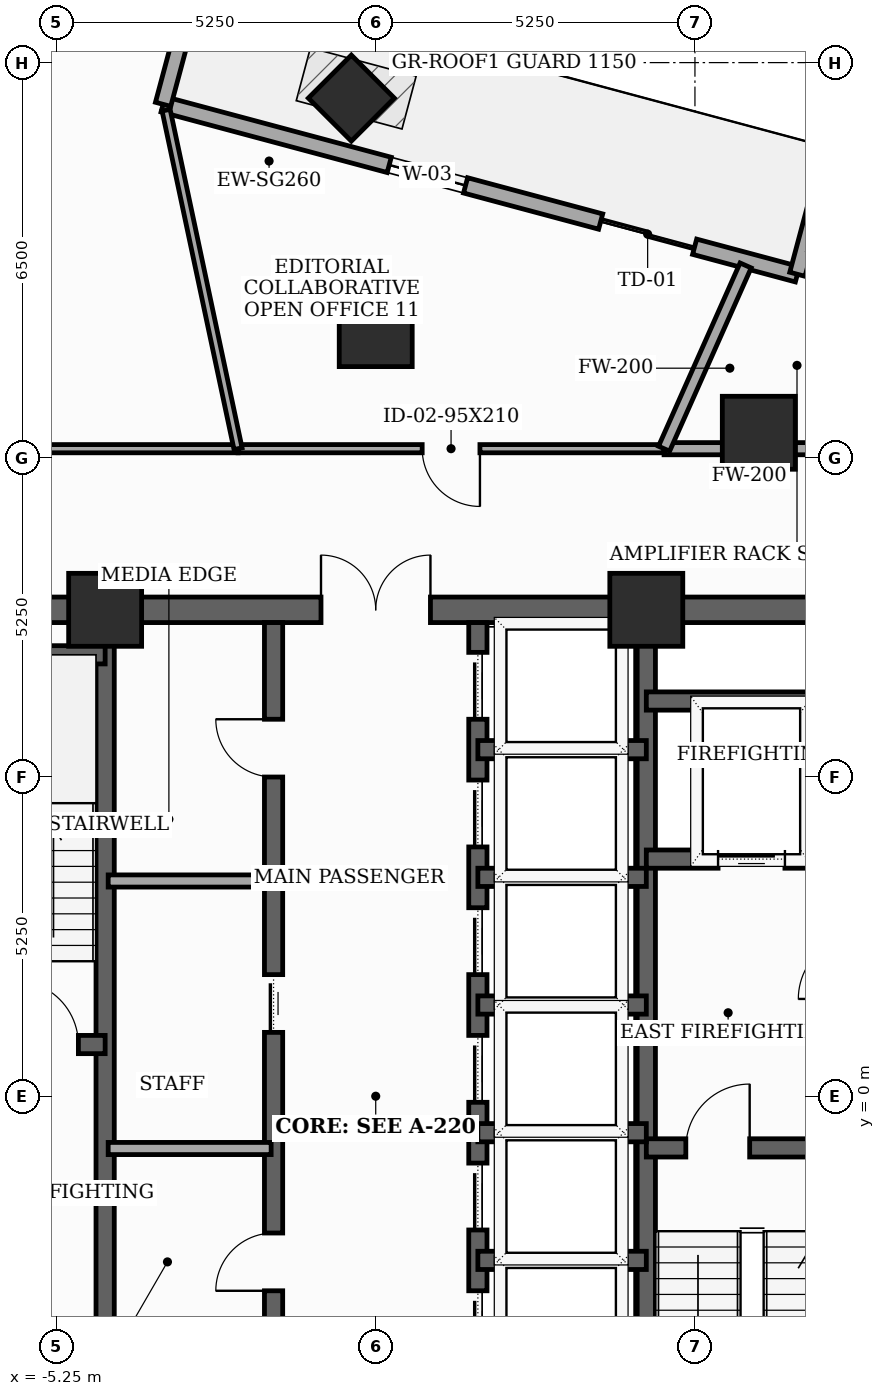
"""IFC4 building model, lengths in metres.
Left out: names, types, materials, properties, quantities, classifications, styles, units other than length and angle.
Written with IfcOpenShell. Run it as: python <this file> out.ifc"""

import sys

from ifc_helpers import new_model, si_unit, direction, frame, frame_2d, origin, origin_2d, place, context, subcontext, project, spatial, rectangle, extrude, element, fill, save


model = new_model("IFC4")
c1 = context("Model", 3, precision=1e-05, world=origin(), true_north=direction((0.0, 1.0)))
c2 = subcontext(c1, "Body", "Model", "MODEL_VIEW")
j1 = project(units=[si_unit("LENGTHUNIT", "METRE"), si_unit("PLANEANGLEUNIT", "RADIAN")], contexts=[c1])
p1 = place(None, origin())
s1 = spatial("IfcSite", under=j1, at=p1, CompositionType="ELEMENT")
p2 = place(p1, origin())
s2 = spatial("IfcBuilding", under=s1, at=p2, CompositionType="ELEMENT")
p3 = place(p2, frame((0.0, 0.0, 191.6)))
s3 = spatial("IfcBuildingStorey", under=s2, at=p3, CompositionType="ELEMENT", Elevation=191.6)
for number, where, z_axis, x_axis in (
    (1, (4.45, 8.0, 0.0), (0.0, 0.0, 1.0), (1.0, 0.0, 0.0)),
    (2, (-4.45, 8.0, 0.0), (0.0, 0.0, 1.0), (1.0, 0.0, 0.0)),
    (3, (6.3, 10.912, 0.0), (0.0, 0.0, 1.0), (1.0, 0.0, 0.0)),
    (4, (0.0, 12.6, 0.0), (0.0, 0.0, 1.0), (1.0, 0.0, 0.0)),
):
    element("IfcColumn", number, at=place(p3, frame(where, z_axis=z_axis, x_axis=x_axis)), inside=s3, PredefinedType="COLUMN", context=c2, shape_type="SweptSolid", body=[
        extrude(rectangle(XDim=1.2, YDim=1.2, at=origin_2d()), origin(), (0.0, 0.0, 1.0), 3.7),
    ])
p4 = place(p3, frame((-0.401, 16.416, 0.0), z_axis=(0.0, 0.0, 1.0), x_axis=(0.707106781187, 0.707106781187, 0.0)))
e5 = element("IfcColumn", 5, at=p4, inside=s3, PredefinedType="COLUMN", context=c2, shape_type="SweptSolid", body=[
    extrude(rectangle(XDim=1.0, YDim=1.0, at=origin_2d()), origin(), (0.0, 0.0, 1.0), 3.7),
])
p5 = place(p3, frame((6.935, 13.519, 0.0), z_axis=(0.0, 0.0, 1.0), x_axis=(-0.965922825334, 0.258830244561, 0.0)))
e6 = element("IfcWall", 6, at=p5, inside=s3, PredefinedType="SOLIDWALL", context=c2, shape_type="SweptSolid", body=[
    extrude(rectangle(XDim=10.8, YDim=0.26, at=frame_2d((5.4, 0.0))), origin(), (0.0, 0.0, 1.0), 3.5),
])
p6 = place(p5, frame((1.75, 0.0, 0.0)))
e7 = element("IfcOpeningElement", 7, at=p6, cuts=e6, PredefinedType="OPENING", context=c2, shape_type="SweptSolid", body=[
    extrude(rectangle(XDim=1.6, YDim=2.08, at=frame_2d((0.8, 1.04))), frame((0.0, 0.14, 0.0), z_axis=(0.0, -1.0, 0.0), x_axis=(1.0, 0.0, 0.0)), (0.0, 0.0, 1.0), 0.28),
])
p7 = place(p5, frame((5.65, 0.0, 0.85)))
e8 = element("IfcOpeningElement", 8, at=p7, cuts=e6, PredefinedType="OPENING", context=c2, shape_type="SweptSolid", body=[
    extrude(rectangle(XDim=1.3, YDim=1.25, at=frame_2d((0.65, 0.625))), frame((0.0, 0.14, 0.0), z_axis=(0.0, -1.0, 0.0), x_axis=(1.0, 0.0, 0.0)), (0.0, 0.0, 1.0), 0.28),
])
p8 = place(p3, frame((7.492, 15.595, 0.0), z_axis=(0.0, 0.0, 1.0), x_axis=(-0.258772030677, -0.96593842254, 0.0)))
e9 = element("IfcWall", 9, at=p8, inside=s3, PredefinedType="SOLIDWALL", context=c2, shape_type="SweptSolid", body=[
    extrude(rectangle(XDim=2.15, YDim=0.26, at=frame_2d((1.075, 0.0))), origin(), (0.0, 0.0, 1.0), 3.5),
])
p9 = place(p3, frame((-3.497, 16.314, 0.0), z_axis=(0.0, 0.0, 1.0), x_axis=(0.258800415469, 0.965930817892, 0.0)))
e10 = element("IfcWall", 10, at=p9, inside=s3, PredefinedType="SOLIDWALL", context=c2, shape_type="SweptSolid", body=[
    extrude(rectangle(XDim=2.15, YDim=0.26, at=frame_2d((1.075, 0.0))), origin(), (0.0, 0.0, 1.0), 3.5),
])
p10 = place(p3, frame((-8.0, 8.0, 0.0), z_axis=(0.0, 0.0, 1.0), x_axis=(1.0, 0.0, 0.0)))
e11 = element("IfcWall", 11, at=p10, inside=s3, PredefinedType="SHEAR", context=c2, shape_type="SweptSolid", body=[
    extrude(rectangle(XDim=16.0, YDim=0.42, at=frame_2d((8.0, 0.0))), origin(), (0.0, 0.0, 1.0), 3.5),
])
p11 = place(p10, frame((7.1, 0.0, 0.0)))
e12 = element("IfcOpeningElement", 12, at=p11, cuts=e11, PredefinedType="OPENING", context=c2, shape_type="SweptSolid", body=[
    extrude(rectangle(XDim=1.8, YDim=2.15, at=frame_2d((0.9, 1.075))), frame((0.0, 0.22, 0.0), z_axis=(0.0, -1.0, 0.0), x_axis=(1.0, 0.0, 0.0)), (0.0, 0.0, 1.0), 0.44),
])
for number, where, z_axis, x_axis in (
    (13, (-4.45, -7.79, 0.0), (0.0, 0.0, 1.0), (0.0, 1.0, 0.0)),
    (14, (4.45, -7.79, 0.0), (0.0, 0.0, 1.0), (0.0, 1.0, 0.0)),
):
    element("IfcWall", number, at=place(p3, frame(where, z_axis=z_axis, x_axis=x_axis)), inside=s3, PredefinedType="SHEAR", context=c2, shape_type="SweptSolid", body=[
        extrude(rectangle(XDim=15.58, YDim=0.3, at=frame_2d((7.79, 0.0))), origin(), (0.0, 0.0, 1.0), 3.5),
    ])
p12 = place(p3, frame((-7.79, 0.85, 0.0), z_axis=(0.0, 0.0, 1.0), x_axis=(1.0, 0.0, 0.0)))
e15 = element("IfcWall", 15, at=p12, inside=s3, PredefinedType="SHEAR", context=c2, shape_type="SweptSolid", body=[
    extrude(rectangle(XDim=3.34, YDim=0.3, at=frame_2d((1.67, 0.0))), origin(), (0.0, 0.0, 1.0), 3.5),
])
p13 = place(p12, frame((1.85, 0.0, 0.0)))
e16 = element("IfcOpeningElement", 16, at=p13, cuts=e15, PredefinedType="OPENING", context=c2, shape_type="SweptSolid", body=[
    extrude(rectangle(XDim=1.05, YDim=2.15, at=frame_2d((0.525, 1.075))), frame((0.0, 0.16, 0.0), z_axis=(0.0, -1.0, 0.0), x_axis=(1.0, 0.0, 0.0)), (0.0, 0.0, 1.0), 0.32),
])
p14 = place(p3, frame((-7.79, 7.26, 0.0), z_axis=(0.0, 0.0, 1.0), x_axis=(1.0, 0.0, 0.0)))
e17 = element("IfcWall", 17, at=p14, inside=s3, PredefinedType="SHEAR", context=c2, shape_type="SweptSolid", body=[
    extrude(rectangle(XDim=3.34, YDim=0.3, at=frame_2d((1.67, 0.0))), origin(), (0.0, 0.0, 1.0), 3.5),
])
p15 = place(p3, frame((4.45, -0.85, 0.0), z_axis=(0.0, 0.0, 1.0), x_axis=(1.0, 0.0, 0.0)))
e18 = element("IfcWall", 18, at=p15, inside=s3, PredefinedType="SHEAR", context=c2, shape_type="SweptSolid", body=[
    extrude(rectangle(XDim=3.34, YDim=0.3, at=frame_2d((1.67, 0.0))), origin(), (0.0, 0.0, 1.0), 3.5),
])
p16 = place(p15, frame((0.65, 0.0, 0.0)))
e19 = element("IfcOpeningElement", 19, at=p16, cuts=e18, PredefinedType="OPENING", context=c2, shape_type="SweptSolid", body=[
    extrude(rectangle(XDim=1.05, YDim=2.15, at=frame_2d((0.525, 1.075))), frame((0.0, 0.16, 0.0), z_axis=(0.0, -1.0, 0.0), x_axis=(1.0, 0.0, 0.0)), (0.0, 0.0, 1.0), 0.32),
])
p17 = place(p3, frame((4.45, 3.9, 0.0), z_axis=(0.0, 0.0, 1.0), x_axis=(1.0, 0.0, 0.0)))
e20 = element("IfcWall", 20, at=p17, inside=s3, PredefinedType="SHEAR", context=c2, shape_type="SweptSolid", body=[
    extrude(rectangle(XDim=3.34, YDim=0.3, at=frame_2d((1.67, 0.0))), origin(), (0.0, 0.0, 1.0), 3.5),
])
p18 = place(p17, frame((1.18, 0.0, 0.0)))
e21 = element("IfcOpeningElement", 21, at=p18, cuts=e20, PredefinedType="OPENING", context=c2, shape_type="SweptSolid", body=[
    extrude(rectangle(XDim=1.1, YDim=2.1, at=frame_2d((0.55, 1.05))), frame((0.0, 0.16, 0.0), z_axis=(0.0, -1.0, 0.0), x_axis=(1.0, 0.0, 0.0)), (0.0, 0.0, 1.0), 0.32),
])
p19 = place(p3, frame((4.45, 6.5, 0.0), z_axis=(0.0, 0.0, 1.0), x_axis=(1.0, 0.0, 0.0)))
e22 = element("IfcWall", 22, at=p19, inside=s3, PredefinedType="SHEAR", context=c2, shape_type="SweptSolid", body=[
    extrude(rectangle(XDim=3.34, YDim=0.3, at=frame_2d((1.67, 0.0))), origin(), (0.0, 0.0, 1.0), 3.5),
])
p20 = place(p3, frame((-1.68, -4.85, 0.0), z_axis=(0.0, 0.0, 1.0), x_axis=(0.0, 1.0, 0.0)))
e23 = element("IfcWall", 23, at=p20, inside=s3, PredefinedType="SHEAR", context=c2, shape_type="SweptSolid", body=[
    extrude(rectangle(XDim=12.64, YDim=0.3, at=frame_2d((6.32, 0.0))), origin(), (0.0, 0.0, 1.0), 3.5),
])
p21 = place(p20, frame((1.65, 0.0, 0.0)))
e24 = element("IfcOpeningElement", 24, at=p21, cuts=e23, PredefinedType="OPENING", context=c2, shape_type="SweptSolid", body=[
    extrude(rectangle(XDim=0.95, YDim=2.1, at=frame_2d((0.475, 1.05))), frame((0.0, 0.16, 0.0), z_axis=(0.0, -1.0, 0.0), x_axis=(1.0, 0.0, 0.0)), (0.0, 0.0, 1.0), 0.32),
])
p22 = place(p20, frame((5.9, 0.0, 0.0)))
e25 = element("IfcOpeningElement", 25, at=p22, cuts=e23, PredefinedType="OPENING", context=c2, shape_type="SweptSolid", body=[
    extrude(rectangle(XDim=0.95, YDim=2.1, at=frame_2d((0.475, 1.05))), frame((0.0, 0.16, 0.0), z_axis=(0.0, -1.0, 0.0), x_axis=(1.0, 0.0, 0.0)), (0.0, 0.0, 1.0), 0.32),
])
p23 = place(p20, frame((10.1, 0.0, 0.0)))
e26 = element("IfcOpeningElement", 26, at=p23, cuts=e23, PredefinedType="OPENING", context=c2, shape_type="SweptSolid", body=[
    extrude(rectangle(XDim=0.95, YDim=2.1, at=frame_2d((0.475, 1.05))), frame((0.0, 0.16, 0.0), z_axis=(0.0, -1.0, 0.0), x_axis=(1.0, 0.0, 0.0)), (0.0, 0.0, 1.0), 0.32),
])
p24 = place(p3, frame((1.68, -4.85, 0.0), z_axis=(0.0, 0.0, 1.0), x_axis=(0.0, 1.0, 0.0)))
e27 = element("IfcWall", 27, at=p24, inside=s3, PredefinedType="SHEAR", context=c2, shape_type="SweptSolid", body=[
    extrude(rectangle(XDim=12.64, YDim=0.3, at=frame_2d((6.32, 0.0))), origin(), (0.0, 0.0, 1.0), 3.5),
])
p25 = place(p24, frame((0.55, 0.0, 0.0)))
e28 = element("IfcOpeningElement", 28, at=p25, cuts=e27, PredefinedType="OPENING", context=c2, shape_type="SweptSolid", body=[
    extrude(rectangle(XDim=1.1, YDim=2.1, at=frame_2d((0.55, 1.05))), frame((0.0, 0.16, 0.0), z_axis=(0.0, -1.0, 0.0), x_axis=(1.0, 0.0, 0.0)), (0.0, 0.0, 1.0), 0.32),
])
p26 = place(p24, frame((2.65, 0.0, 0.0)))
e29 = element("IfcOpeningElement", 29, at=p26, cuts=e27, PredefinedType="OPENING", context=c2, shape_type="SweptSolid", body=[
    extrude(rectangle(XDim=1.1, YDim=2.1, at=frame_2d((0.55, 1.05))), frame((0.0, 0.16, 0.0), z_axis=(0.0, -1.0, 0.0), x_axis=(1.0, 0.0, 0.0)), (0.0, 0.0, 1.0), 0.32),
])
p27 = place(p24, frame((4.75, 0.0, 0.0)))
e30 = element("IfcOpeningElement", 30, at=p27, cuts=e27, PredefinedType="OPENING", context=c2, shape_type="SweptSolid", body=[
    extrude(rectangle(XDim=1.1, YDim=2.1, at=frame_2d((0.55, 1.05))), frame((0.0, 0.16, 0.0), z_axis=(0.0, -1.0, 0.0), x_axis=(1.0, 0.0, 0.0)), (0.0, 0.0, 1.0), 0.32),
])
p28 = place(p24, frame((6.85, 0.0, 0.0)))
e31 = element("IfcOpeningElement", 31, at=p28, cuts=e27, PredefinedType="OPENING", context=c2, shape_type="SweptSolid", body=[
    extrude(rectangle(XDim=1.1, YDim=2.1, at=frame_2d((0.55, 1.05))), frame((0.0, 0.16, 0.0), z_axis=(0.0, -1.0, 0.0), x_axis=(1.0, 0.0, 0.0)), (0.0, 0.0, 1.0), 0.32),
])
p29 = place(p24, frame((8.95, 0.0, 0.0)))
e32 = element("IfcOpeningElement", 32, at=p29, cuts=e27, PredefinedType="OPENING", context=c2, shape_type="SweptSolid", body=[
    extrude(rectangle(XDim=1.1, YDim=2.1, at=frame_2d((0.55, 1.05))), frame((0.0, 0.16, 0.0), z_axis=(0.0, -1.0, 0.0), x_axis=(1.0, 0.0, 0.0)), (0.0, 0.0, 1.0), 0.32),
])
p30 = place(p24, frame((11.05, 0.0, 0.0)))
e33 = element("IfcOpeningElement", 33, at=p30, cuts=e27, PredefinedType="OPENING", context=c2, shape_type="SweptSolid", body=[
    extrude(rectangle(XDim=1.1, YDim=2.1, at=frame_2d((0.55, 1.05))), frame((0.0, 0.16, 0.0), z_axis=(0.0, -1.0, 0.0), x_axis=(1.0, 0.0, 0.0)), (0.0, 0.0, 1.0), 0.32),
])
for number, where, z_axis, x_axis in (
    (34, (1.68, 1.5, 0.0), (0.0, 0.0, 1.0), (1.0, 0.0, 0.0)),
    (35, (1.68, 3.6, 0.0), (0.0, 0.0, 1.0), (1.0, 0.0, 0.0)),
    (36, (1.68, 5.7, 0.0), (0.0, 0.0, 1.0), (1.0, 0.0, 0.0)),
    (37, (1.68, -2.7, 0.0), (0.0, 0.0, 1.0), (1.0, 0.0, 0.0)),
    (38, (1.68, -0.6, 0.0), (0.0, 0.0, 1.0), (1.0, 0.0, 0.0)),
):
    element("IfcWall", number, at=place(p3, frame(where, z_axis=z_axis, x_axis=x_axis)), inside=s3, PredefinedType="SHEAR", context=c2, shape_type="SweptSolid", body=[
        extrude(rectangle(XDim=2.77, YDim=0.3, at=frame_2d((1.385, 0.0))), origin(), (0.0, 0.0, 1.0), 3.5),
    ])
for number, where, z_axis, x_axis in (
    (39, (-4.4, -0.86, 0.0), (0.0, 0.0, 1.0), (1.0, 0.0, 0.0)),
    (40, (-4.4, 3.54, 0.0), (0.0, 0.0, 1.0), (1.0, 0.0, 0.0)),
):
    element("IfcWall", number, at=place(p3, frame(where, z_axis=z_axis, x_axis=x_axis)), inside=s3, PredefinedType="SOLIDWALL", context=c2, shape_type="SweptSolid", body=[
        extrude(rectangle(XDim=2.68, YDim=0.2, at=frame_2d((1.34, 0.0))), origin(), (0.0, 0.0, 1.0), 3.5),
    ])
p31 = place(p3, frame((10.15, 10.65, 0.0), z_axis=(0.0, 0.0, 1.0), x_axis=(-1.0, 0.0, 0.0)))
e41 = element("IfcWall", 41, at=p31, inside=s3, PredefinedType="SOLIDWALL", context=c2, shape_type="SweptSolid", body=[
    extrude(rectangle(XDim=5.408, YDim=0.2, at=frame_2d((2.704, 0.0))), origin(), (0.0, 0.0, 1.0), 2.885),
])
p32 = place(p31, frame((0.607, 0.0, 0.0)))
e42 = element("IfcOpeningElement", 42, at=p32, cuts=e41, PredefinedType="OPENING", context=c2, shape_type="SweptSolid", body=[
    extrude(rectangle(XDim=0.95, YDim=2.1, at=frame_2d((0.475, 1.05))), frame((0.0, 0.11, 0.0), z_axis=(0.0, -1.0, 0.0), x_axis=(1.0, 0.0, 0.0)), (0.0, 0.0, 1.0), 0.22),
])
p33 = place(p3, frame((4.742, 10.65, 0.0), z_axis=(0.0, 0.0, 1.0), x_axis=(-1.0, 0.0, 0.0)))
e43 = element("IfcWall", 43, at=p33, inside=s3, PredefinedType="PARTITIONING", context=c2, shape_type="SweptSolid", body=[
    extrude(rectangle(XDim=7.006, YDim=0.135, at=frame_2d((3.503, 0.0))), origin(), (0.0, 0.0, 1.0), 2.885),
])
p34 = place(p33, frame((3.028, 0.0, 0.0)))
e44 = element("IfcOpeningElement", 44, at=p34, cuts=e43, PredefinedType="OPENING", context=c2, shape_type="SweptSolid", body=[
    extrude(rectangle(XDim=0.95, YDim=2.1, at=frame_2d((0.475, 1.05))), frame((0.0, 0.077, 0.0), z_axis=(0.0, -1.0, 0.0), x_axis=(1.0, 0.0, 0.0)), (0.0, 0.0, 1.0), 0.155),
])
p35 = place(p3, frame((-2.264, 10.65, 0.0), z_axis=(0.0, 0.0, 1.0), x_axis=(-1.0, 0.0, 0.0)))
e45 = element("IfcWall", 45, at=p35, inside=s3, PredefinedType="PARTITIONING", context=c2, shape_type="SweptSolid", body=[
    extrude(rectangle(XDim=7.886, YDim=0.135, at=frame_2d((3.943, 0.0))), origin(), (0.0, 0.0, 1.0), 2.885),
])
p36 = place(p3, frame((6.083, 13.664, 0.0), z_axis=(0.0, 0.0, 1.0), x_axis=(-0.406625887871, -0.913594760993, 0.0)))
e46 = element("IfcWall", 46, at=p36, inside=s3, PredefinedType="SOLIDWALL", context=c2, shape_type="SweptSolid", body=[
    extrude(rectangle(XDim=3.299, YDim=0.2, at=frame_2d((1.65, 0.0))), origin(), (0.0, 0.0, 1.0), 2.885),
])
p37 = place(p3, frame((-3.447, 16.218, 0.0), z_axis=(0.0, 0.0, 1.0), x_axis=(0.207888507592, -0.978152528193, 0.0)))
e47 = element("IfcWall", 47, at=p37, inside=s3, PredefinedType="PARTITIONING", context=c2, shape_type="SweptSolid", body=[
    extrude(rectangle(XDim=5.692, YDim=0.135, at=frame_2d((2.846, 0.0))), origin(), (0.0, 0.0, 1.0), 2.885),
])
p38 = place(p6, frame((1.6, 0.0, 0.0), z_axis=(0.0, 0.0, 1.0), x_axis=(-1.0, 0.0, 0.0)))
e48 = element("IfcDoor", 48, at=p38, inside=s3, OperationType="DOUBLE_DOOR_SLIDING", PredefinedType="DOOR", context=c2, shape_type="SweptSolid", body=[
    extrude(rectangle(XDim=1.6, YDim=2.08, at=frame_2d((0.8, 1.04))), frame((0.0, 0.025, 0.0), z_axis=(0.0, -1.0, 0.0), x_axis=(1.0, 0.0, 0.0)), (0.0, 0.0, 1.0), 0.05),
])
fill(e7, e48)
p39 = place(p7, origin())
e49 = element("IfcWindow", 49, at=p39, inside=s3, PartitioningType="SINGLE_PANEL", PredefinedType="WINDOW", context=c2, shape_type="SweptSolid", body=[
    extrude(rectangle(XDim=1.3, YDim=1.25, at=frame_2d((0.65, 0.625))), frame((0.0, 0.03, 0.0), z_axis=(0.0, -1.0, 0.0), x_axis=(1.0, 0.0, 0.0)), (0.0, 0.0, 1.0), 0.06),
])
fill(e8, e49)
p40 = place(p11, origin())
e50 = element("IfcDoor", 50, at=p40, inside=s3, OperationType="DOUBLE_DOOR_SINGLE_SWING", PredefinedType="DOOR", context=c2, shape_type="SweptSolid", body=[
    extrude(rectangle(XDim=1.8, YDim=2.15, at=frame_2d((0.9, 1.075))), frame((0.0, 0.025, 0.0), z_axis=(0.0, -1.0, 0.0), x_axis=(1.0, 0.0, 0.0)), (0.0, 0.0, 1.0), 0.05),
])
fill(e12, e50)
p41 = place(p13, origin())
e51 = element("IfcDoor", 51, at=p41, inside=s3, OperationType="SINGLE_SWING_LEFT", PredefinedType="DOOR", context=c2, shape_type="SweptSolid", body=[
    extrude(rectangle(XDim=1.05, YDim=2.15, at=frame_2d((0.525, 1.075))), frame((0.0, 0.025, 0.0), z_axis=(0.0, -1.0, 0.0), x_axis=(1.0, 0.0, 0.0)), (0.0, 0.0, 1.0), 0.05),
])
fill(e16, e51)
p42 = place(p16, origin())
e52 = element("IfcDoor", 52, at=p42, inside=s3, OperationType="SINGLE_SWING_RIGHT", PredefinedType="DOOR", context=c2, shape_type="SweptSolid", body=[
    extrude(rectangle(XDim=1.05, YDim=2.15, at=frame_2d((0.525, 1.075))), frame((0.0, 0.025, 0.0), z_axis=(0.0, -1.0, 0.0), x_axis=(1.0, 0.0, 0.0)), (0.0, 0.0, 1.0), 0.05),
])
fill(e19, e52)
p43 = place(p18, origin())
e53 = element("IfcDoor", 53, at=p43, inside=s3, OperationType="SLIDING_TO_LEFT", PredefinedType="DOOR", context=c2, shape_type="SweptSolid", body=[
    extrude(rectangle(XDim=1.1, YDim=2.1, at=frame_2d((0.55, 1.05))), frame((0.0, 0.025, 0.0), z_axis=(0.0, -1.0, 0.0), x_axis=(1.0, 0.0, 0.0)), (0.0, 0.0, 1.0), 0.05),
])
fill(e21, e53)
p44 = place(p21, origin())
e54 = element("IfcDoor", 54, at=p44, inside=s3, OperationType="SINGLE_SWING_LEFT", PredefinedType="DOOR", context=c2, shape_type="SweptSolid", body=[
    extrude(rectangle(XDim=0.95, YDim=2.1, at=frame_2d((0.475, 1.05))), frame((0.0, 0.025, 0.0), z_axis=(0.0, -1.0, 0.0), x_axis=(1.0, 0.0, 0.0)), (0.0, 0.0, 1.0), 0.05),
])
fill(e24, e54)
p45 = place(p22, origin())
e55 = element("IfcDoor", 55, at=p45, inside=s3, OperationType="SLIDING_TO_LEFT", PredefinedType="DOOR", context=c2, shape_type="SweptSolid", body=[
    extrude(rectangle(XDim=0.95, YDim=2.1, at=frame_2d((0.475, 1.05))), frame((0.0, 0.025, 0.0), z_axis=(0.0, -1.0, 0.0), x_axis=(1.0, 0.0, 0.0)), (0.0, 0.0, 1.0), 0.05),
])
fill(e25, e55)
p46 = place(p23, origin())
e56 = element("IfcDoor", 56, at=p46, inside=s3, OperationType="SINGLE_SWING_RIGHT", PredefinedType="DOOR", context=c2, shape_type="SweptSolid", body=[
    extrude(rectangle(XDim=0.95, YDim=2.1, at=frame_2d((0.475, 1.05))), frame((0.0, 0.025, 0.0), z_axis=(0.0, -1.0, 0.0), x_axis=(1.0, 0.0, 0.0)), (0.0, 0.0, 1.0), 0.05),
])
fill(e26, e56)
p47 = place(p25, origin())
e57 = element("IfcDoor", 57, at=p47, inside=s3, OperationType="SLIDING_TO_LEFT", PredefinedType="DOOR", context=c2, shape_type="SweptSolid", body=[
    extrude(rectangle(XDim=1.1, YDim=2.1, at=frame_2d((0.55, 1.05))), frame((0.0, 0.025, 0.0), z_axis=(0.0, -1.0, 0.0), x_axis=(1.0, 0.0, 0.0)), (0.0, 0.0, 1.0), 0.05),
])
fill(e28, e57)
p48 = place(p26, origin())
e58 = element("IfcDoor", 58, at=p48, inside=s3, OperationType="SLIDING_TO_LEFT", PredefinedType="DOOR", context=c2, shape_type="SweptSolid", body=[
    extrude(rectangle(XDim=1.1, YDim=2.1, at=frame_2d((0.55, 1.05))), frame((0.0, 0.025, 0.0), z_axis=(0.0, -1.0, 0.0), x_axis=(1.0, 0.0, 0.0)), (0.0, 0.0, 1.0), 0.05),
])
fill(e29, e58)
p49 = place(p27, origin())
e59 = element("IfcDoor", 59, at=p49, inside=s3, OperationType="SLIDING_TO_LEFT", PredefinedType="DOOR", context=c2, shape_type="SweptSolid", body=[
    extrude(rectangle(XDim=1.1, YDim=2.1, at=frame_2d((0.55, 1.05))), frame((0.0, 0.025, 0.0), z_axis=(0.0, -1.0, 0.0), x_axis=(1.0, 0.0, 0.0)), (0.0, 0.0, 1.0), 0.05),
])
fill(e30, e59)
p50 = place(p28, origin())
e60 = element("IfcDoor", 60, at=p50, inside=s3, OperationType="SLIDING_TO_LEFT", PredefinedType="DOOR", context=c2, shape_type="SweptSolid", body=[
    extrude(rectangle(XDim=1.1, YDim=2.1, at=frame_2d((0.55, 1.05))), frame((0.0, 0.025, 0.0), z_axis=(0.0, -1.0, 0.0), x_axis=(1.0, 0.0, 0.0)), (0.0, 0.0, 1.0), 0.05),
])
fill(e31, e60)
p51 = place(p29, origin())
e61 = element("IfcDoor", 61, at=p51, inside=s3, OperationType="SLIDING_TO_LEFT", PredefinedType="DOOR", context=c2, shape_type="SweptSolid", body=[
    extrude(rectangle(XDim=1.1, YDim=2.1, at=frame_2d((0.55, 1.05))), frame((0.0, 0.025, 0.0), z_axis=(0.0, -1.0, 0.0), x_axis=(1.0, 0.0, 0.0)), (0.0, 0.0, 1.0), 0.05),
])
fill(e32, e61)
p52 = place(p30, origin())
e62 = element("IfcDoor", 62, at=p52, inside=s3, OperationType="SLIDING_TO_LEFT", PredefinedType="DOOR", context=c2, shape_type="SweptSolid", body=[
    extrude(rectangle(XDim=1.1, YDim=2.1, at=frame_2d((0.55, 1.05))), frame((0.0, 0.025, 0.0), z_axis=(0.0, -1.0, 0.0), x_axis=(1.0, 0.0, 0.0)), (0.0, 0.0, 1.0), 0.05),
])
fill(e33, e62)
p53 = place(p34, origin())
e63 = element("IfcDoor", 63, at=p53, inside=s3, OperationType="SINGLE_SWING_LEFT", PredefinedType="DOOR", context=c2, shape_type="SweptSolid", body=[
    extrude(rectangle(XDim=0.95, YDim=2.1, at=frame_2d((0.475, 1.05))), frame((0.0, 0.025, 0.0), z_axis=(0.0, -1.0, 0.0), x_axis=(1.0, 0.0, 0.0)), (0.0, 0.0, 1.0), 0.05),
])
fill(e44, e63)
save(model, sys.argv[1])
